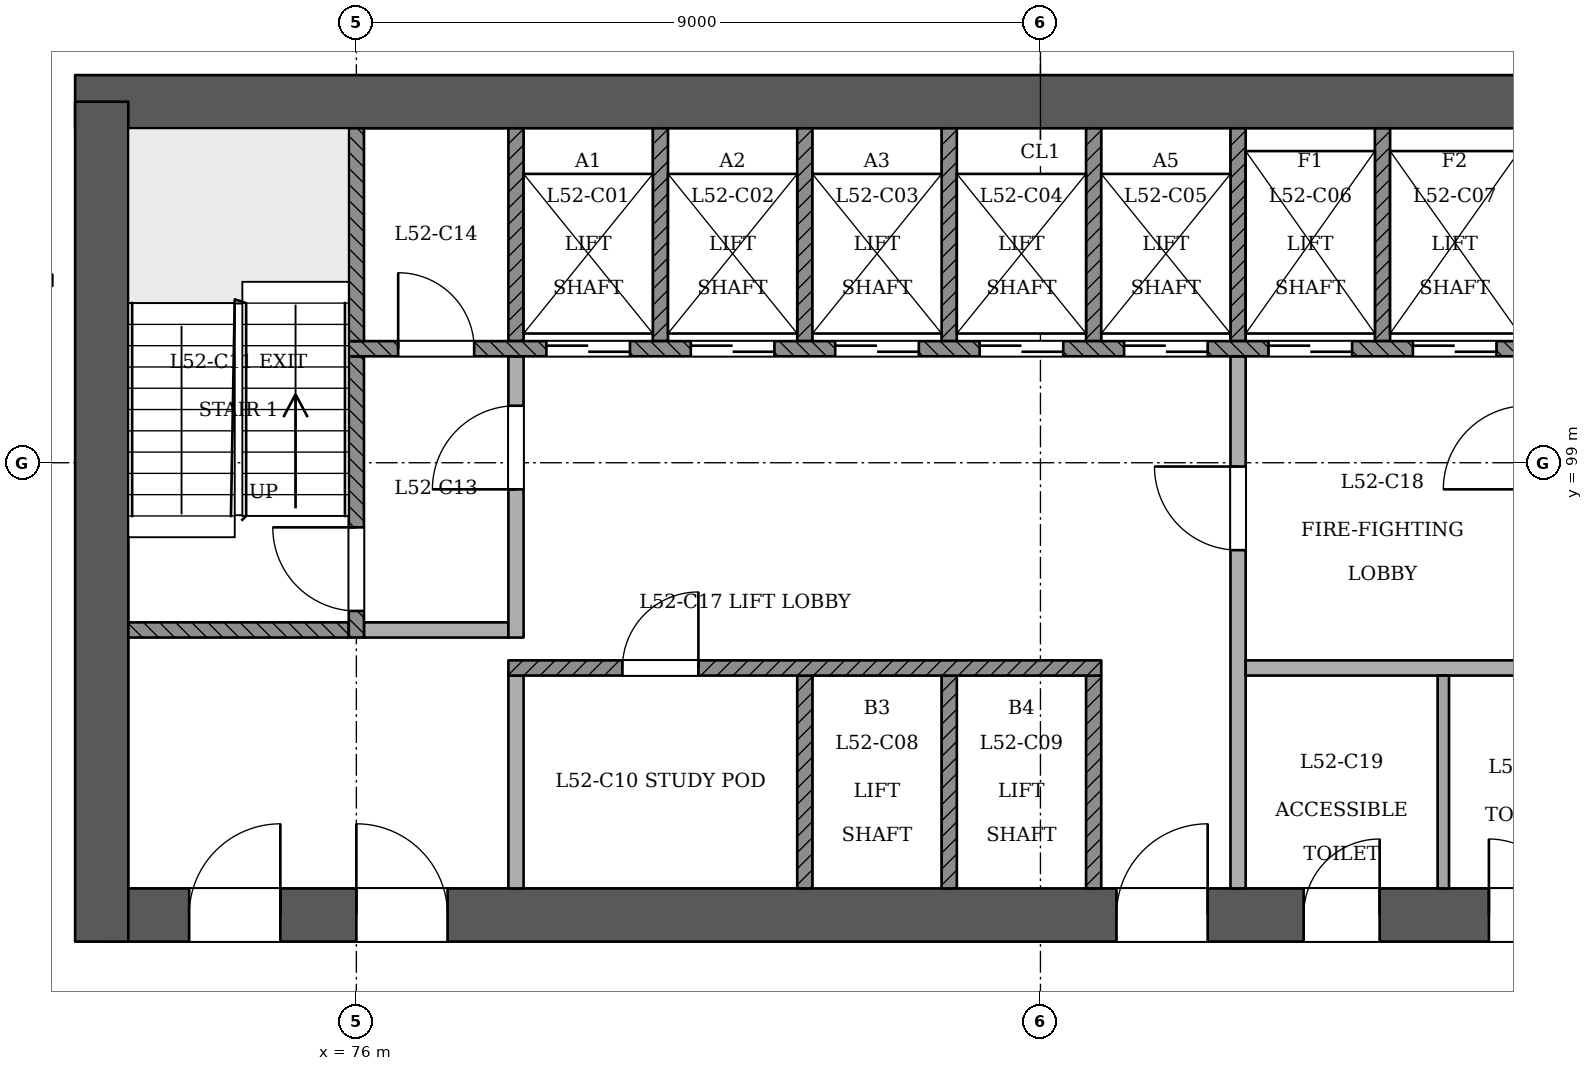
"""IFC4 building model, lengths in metres.
Left out: names, types, materials, properties, quantities, classifications, styles, units other than length and angle.
Written with IfcOpenShell. Run it as: python <this file> out.ifc"""

import sys

from ifc_helpers import new_model, si_unit, direction, frame, frame_2d, origin, place, context, subcontext, project, spatial, rectangle, extrude, element, fill, save


model = new_model("IFC4")
c1 = context("Model", 3, precision=1e-05, world=origin(), true_north=direction((0.0, 1.0)))
c2 = subcontext(c1, "Body", "Model", "MODEL_VIEW")
j1 = project(units=[si_unit("LENGTHUNIT", "METRE"), si_unit("PLANEANGLEUNIT", "RADIAN")], contexts=[c1])
p1 = place(None, origin())
s1 = spatial("IfcSite", under=j1, at=p1, CompositionType="ELEMENT")
p2 = place(p1, origin())
s2 = spatial("IfcBuilding", under=s1, at=p2, CompositionType="ELEMENT")
p3 = place(p2, frame((0.0, 0.0, 201.6)))
s3 = spatial("IfcBuildingStorey", under=s2, at=p3, CompositionType="ELEMENT", Elevation=201.6)
p4 = place(p3, frame((72.65, 93.05, 0.0), z_axis=(0.0, 0.0, 1.0), x_axis=(1.0, 0.0, 0.0)))
e1 = element("IfcWall", 1, at=p4, inside=s3, PredefinedType="SHEAR", context=c2, shape_type="SweptSolid", body=[
    extrude(rectangle(XDim=25.05, YDim=0.7, at=frame_2d((12.525, 0.0))), origin(), (0.0, 0.0, 1.0), 3.6),
])
p5 = place(p4, frame((1.15, 0.0, 0.0)))
e2 = element("IfcOpeningElement", 2, at=p5, cuts=e1, PredefinedType="OPENING", context=c2, shape_type="SweptSolid", body=[
    extrude(rectangle(XDim=1.2, YDim=2.1, at=frame_2d((0.6, 1.05))), frame((0.0, 0.36, 0.0), z_axis=(0.0, -1.0, 0.0), x_axis=(1.0, 0.0, 0.0)), (0.0, 0.0, 1.0), 0.721),
])
p6 = place(p4, frame((3.35, 0.0, 0.0)))
e3 = element("IfcOpeningElement", 3, at=p6, cuts=e1, PredefinedType="OPENING", context=c2, shape_type="SweptSolid", body=[
    extrude(rectangle(XDim=1.2, YDim=2.1, at=frame_2d((0.6, 1.05))), frame((0.0, 0.36, 0.0), z_axis=(0.0, -1.0, 0.0), x_axis=(1.0, 0.0, 0.0)), (0.0, 0.0, 1.0), 0.721),
])
p7 = place(p4, frame((13.35, 0.0, 0.0)))
e4 = element("IfcOpeningElement", 4, at=p7, cuts=e1, PredefinedType="OPENING", context=c2, shape_type="SweptSolid", body=[
    extrude(rectangle(XDim=1.2, YDim=2.1, at=frame_2d((0.6, 1.05))), frame((0.0, 0.36, 0.0), z_axis=(0.0, -1.0, 0.0), x_axis=(1.0, 0.0, 0.0)), (0.0, 0.0, 1.0), 0.721),
])
p8 = place(p4, frame((15.812, 0.0, 0.0)))
e5 = element("IfcOpeningElement", 5, at=p8, cuts=e1, PredefinedType="OPENING", context=c2, shape_type="SweptSolid", body=[
    extrude(rectangle(XDim=1.0, YDim=2.1, at=frame_2d((0.5, 1.05))), frame((0.0, 0.36, 0.0), z_axis=(0.0, -1.0, 0.0), x_axis=(1.0, 0.0, 0.0)), (0.0, 0.0, 1.0), 0.721),
])
p9 = place(p4, frame((18.25, 0.0, 0.0)))
e6 = element("IfcOpeningElement", 6, at=p9, cuts=e1, PredefinedType="OPENING", context=c2, shape_type="SweptSolid", body=[
    extrude(rectangle(XDim=1.0, YDim=2.1, at=frame_2d((0.5, 1.05))), frame((0.0, 0.36, 0.0), z_axis=(0.0, -1.0, 0.0), x_axis=(1.0, 0.0, 0.0)), (0.0, 0.0, 1.0), 0.721),
])
p10 = place(p4, frame((20.6, 0.0, 0.0)))
e7 = element("IfcOpeningElement", 7, at=p10, cuts=e1, PredefinedType="OPENING", context=c2, shape_type="SweptSolid", body=[
    extrude(rectangle(XDim=1.0, YDim=2.1, at=frame_2d((0.5, 1.05))), frame((0.0, 0.36, 0.0), z_axis=(0.0, -1.0, 0.0), x_axis=(1.0, 0.0, 0.0)), (0.0, 0.0, 1.0), 0.721),
])
p11 = place(p4, frame((22.887, 0.0, 0.0)))
e8 = element("IfcOpeningElement", 8, at=p11, cuts=e1, PredefinedType="OPENING", context=c2, shape_type="SweptSolid", body=[
    extrude(rectangle(XDim=1.0, YDim=2.1, at=frame_2d((0.5, 1.05))), frame((0.0, 0.36, 0.0), z_axis=(0.0, -1.0, 0.0), x_axis=(1.0, 0.0, 0.0)), (0.0, 0.0, 1.0), 0.721),
])
p12 = place(p3, frame((97.35, 103.75, 0.0), z_axis=(0.0, 0.0, 1.0), x_axis=(-1.0, 0.0, 0.0)))
e9 = element("IfcWall", 9, at=p12, inside=s3, PredefinedType="SHEAR", context=c2, shape_type="SweptSolid", body=[
    extrude(rectangle(XDim=25.05, YDim=0.7, at=frame_2d((12.525, 0.0))), origin(), (0.0, 0.0, 1.0), 3.6),
])
p13 = place(p3, frame((72.65, 103.75, 0.0), z_axis=(0.0, 0.0, 1.0), x_axis=(0.0, -1.0, 0.0)))
e10 = element("IfcWall", 10, at=p13, inside=s3, PredefinedType="SHEAR", context=c2, shape_type="SweptSolid", body=[
    extrude(rectangle(XDim=11.05, YDim=0.7, at=frame_2d((5.525, 0.0))), origin(), (0.0, 0.0, 1.0), 3.6),
])
p14 = place(p3, frame((78.1, 93.4, 0.0), z_axis=(0.0, 0.0, 1.0), x_axis=(0.0, 1.0, 0.0)))
e11 = element("IfcWall", 11, at=p14, inside=s3, PredefinedType="PARTITIONING", context=c2, shape_type="SweptSolid", body=[
    extrude(rectangle(XDim=2.8, YDim=0.2, at=frame_2d((1.4, 0.0))), origin(), (0.0, 0.0, 1.0), 3.15),
])
for number, where, z_axis, x_axis in (
    (12, (81.9, 93.4, 0.0), (0.0, 0.0, 1.0), (0.0, 1.0, 0.0)),
    (13, (83.8, 93.4, 0.0), (0.0, 0.0, 1.0), (0.0, 1.0, 0.0)),
    (14, (85.7, 93.4, 0.0), (0.0, 0.0, 1.0), (0.0, 1.0, 0.0)),
):
    element("IfcWall", number, at=place(p3, frame(where, z_axis=z_axis, x_axis=x_axis)), inside=s3, PredefinedType="SOLIDWALL", context=c2, shape_type="SweptSolid", body=[
        extrude(rectangle(XDim=2.8, YDim=0.2, at=frame_2d((1.4, 0.0))), origin(), (0.0, 0.0, 1.0), 3.15),
    ])
p15 = place(p3, frame((87.6, 93.4, 0.0), z_axis=(0.0, 0.0, 1.0), x_axis=(0.0, 1.0, 0.0)))
e15 = element("IfcWall", 15, at=p15, inside=s3, PredefinedType="PARTITIONING", context=c2, shape_type="SweptSolid", body=[
    extrude(rectangle(XDim=7.0, YDim=0.2, at=frame_2d((3.5, 0.0))), origin(), (0.0, 0.0, 1.0), 3.15),
])
p16 = place(p15, frame((4.45, 0.0, 0.0)))
e16 = element("IfcOpeningElement", 16, at=p16, cuts=e15, PredefinedType="OPENING", context=c2, shape_type="SweptSolid", body=[
    extrude(rectangle(XDim=1.1, YDim=2.1, at=frame_2d((0.55, 1.05))), frame((0.0, 0.11, 0.0), z_axis=(0.0, -1.0, 0.0), x_axis=(1.0, 0.0, 0.0)), (0.0, 0.0, 1.0), 0.221),
])
p17 = place(p3, frame((90.3, 93.4, 0.0), z_axis=(0.0, 0.0, 1.0), x_axis=(0.0, 1.0, 0.0)))
e17 = element("IfcWall", 17, at=p17, inside=s3, PredefinedType="PARTITIONING", context=c2, shape_type="SweptSolid", body=[
    extrude(rectangle(XDim=2.8, YDim=0.15, at=frame_2d((1.4, 0.0))), origin(), (0.0, 0.0, 1.0), 3.15),
])
p18 = place(p3, frame((78.0, 96.3, 0.0), z_axis=(0.0, 0.0, 1.0), x_axis=(1.0, 0.0, 0.0)))
e18 = element("IfcWall", 18, at=p18, inside=s3, PredefinedType="SOLIDWALL", context=c2, shape_type="SweptSolid", body=[
    extrude(rectangle(XDim=7.8, YDim=0.2, at=frame_2d((3.9, 0.0))), origin(), (0.0, 0.0, 1.0), 3.15),
])
p19 = place(p18, frame((1.5, 0.0, 0.0)))
e19 = element("IfcOpeningElement", 19, at=p19, cuts=e18, PredefinedType="OPENING", context=c2, shape_type="SweptSolid", body=[
    extrude(rectangle(XDim=1.0, YDim=2.1, at=frame_2d((0.5, 1.05))), frame((0.0, 0.11, 0.0), z_axis=(0.0, -1.0, 0.0), x_axis=(1.0, 0.0, 0.0)), (0.0, 0.0, 1.0), 0.221),
])
p20 = place(p3, frame((87.7, 96.3, 0.0), z_axis=(0.0, 0.0, 1.0), x_axis=(1.0, 0.0, 0.0)))
e20 = element("IfcWall", 20, at=p20, inside=s3, PredefinedType="PARTITIONING", context=c2, shape_type="SweptSolid", body=[
    extrude(rectangle(XDim=3.6, YDim=0.2, at=frame_2d((1.8, 0.0))), origin(), (0.0, 0.0, 1.0), 3.15),
])
p21 = place(p3, frame((73.0, 96.8, 0.0), z_axis=(0.0, 0.0, 1.0), x_axis=(1.0, 0.0, 0.0)))
e21 = element("IfcWall", 21, at=p21, inside=s3, PredefinedType="SOLIDWALL", context=c2, shape_type="SweptSolid", body=[
    extrude(rectangle(XDim=2.9, YDim=0.2, at=frame_2d((1.45, 0.0))), origin(), (0.0, 0.0, 1.0), 3.15),
])
p22 = place(p3, frame((76.0, 96.7, 0.0), z_axis=(0.0, 0.0, 1.0), x_axis=(0.0, 1.0, 0.0)))
e22 = element("IfcWall", 22, at=p22, inside=s3, PredefinedType="SOLIDWALL", context=c2, shape_type="SweptSolid", body=[
    extrude(rectangle(XDim=3.7, YDim=0.2, at=frame_2d((1.85, 0.0))), origin(), (0.0, 0.0, 1.0), 3.15),
])
p23 = place(p22, frame((0.35, 0.0, 0.0)))
e23 = element("IfcOpeningElement", 23, at=p23, cuts=e22, PredefinedType="OPENING", context=c2, shape_type="SweptSolid", body=[
    extrude(rectangle(XDim=1.1, YDim=2.1, at=frame_2d((0.55, 1.05))), frame((0.0, 0.11, 0.0), z_axis=(0.0, -1.0, 0.0), x_axis=(1.0, 0.0, 0.0)), (0.0, 0.0, 1.0), 0.221),
])
p24 = place(p3, frame((76.1, 96.8, 0.0), z_axis=(0.0, 0.0, 1.0), x_axis=(1.0, 0.0, 0.0)))
e24 = element("IfcWall", 24, at=p24, inside=s3, PredefinedType="PARTITIONING", context=c2, shape_type="SweptSolid", body=[
    extrude(rectangle(XDim=1.9, YDim=0.2, at=frame_2d((0.95, 0.0))), origin(), (0.0, 0.0, 1.0), 3.15),
])
p25 = place(p3, frame((78.1, 96.7, 0.0), z_axis=(0.0, 0.0, 1.0), x_axis=(0.0, 1.0, 0.0)))
e25 = element("IfcWall", 25, at=p25, inside=s3, PredefinedType="PARTITIONING", context=c2, shape_type="SweptSolid", body=[
    extrude(rectangle(XDim=3.7, YDim=0.2, at=frame_2d((1.85, 0.0))), origin(), (0.0, 0.0, 1.0), 3.15),
])
p26 = place(p25, frame((1.95, 0.0, 0.0)))
e26 = element("IfcOpeningElement", 26, at=p26, cuts=e25, PredefinedType="OPENING", context=c2, shape_type="SweptSolid", body=[
    extrude(rectangle(XDim=1.1, YDim=2.1, at=frame_2d((0.55, 1.05))), frame((0.0, 0.11, 0.0), z_axis=(0.0, -1.0, 0.0), x_axis=(1.0, 0.0, 0.0)), (0.0, 0.0, 1.0), 0.221),
])
p27 = place(p3, frame((75.9, 100.5, 0.0), z_axis=(0.0, 0.0, 1.0), x_axis=(1.0, 0.0, 0.0)))
e27 = element("IfcWall", 27, at=p27, inside=s3, PredefinedType="SOLIDWALL", context=c2, shape_type="SweptSolid", body=[
    extrude(rectangle(XDim=18.2, YDim=0.2, at=frame_2d((9.1, 0.0))), origin(), (0.0, 0.0, 1.0), 3.15),
])
p28 = place(p27, frame((2.6, 0.0, 0.0)))
e28 = element("IfcOpeningElement", 28, at=p28, cuts=e27, PredefinedType="OPENING", context=c2, shape_type="SweptSolid", body=[
    extrude(rectangle(XDim=1.1, YDim=2.1, at=frame_2d((0.55, 1.05))), frame((0.0, 0.11, 0.0), z_axis=(0.0, -1.0, 0.0), x_axis=(1.0, 0.0, 0.0)), (0.0, 0.0, 1.0), 0.221),
])
p29 = place(p27, frame((4.5, 0.0, 0.0)))
e29 = element("IfcOpeningElement", 29, at=p29, cuts=e27, PredefinedType="OPENING", context=c2, shape_type="SweptSolid", body=[
    extrude(rectangle(XDim=1.1, YDim=2.1, at=frame_2d((0.55, 1.05))), frame((0.0, 0.11, 0.0), z_axis=(0.0, -1.0, 0.0), x_axis=(1.0, 0.0, 0.0)), (0.0, 0.0, 1.0), 0.221),
])
p30 = place(p27, frame((6.4, 0.0, 0.0)))
e30 = element("IfcOpeningElement", 30, at=p30, cuts=e27, PredefinedType="OPENING", context=c2, shape_type="SweptSolid", body=[
    extrude(rectangle(XDim=1.1, YDim=2.1, at=frame_2d((0.55, 1.05))), frame((0.0, 0.11, 0.0), z_axis=(0.0, -1.0, 0.0), x_axis=(1.0, 0.0, 0.0)), (0.0, 0.0, 1.0), 0.221),
])
p31 = place(p27, frame((8.3, 0.0, 0.0)))
e31 = element("IfcOpeningElement", 31, at=p31, cuts=e27, PredefinedType="OPENING", context=c2, shape_type="SweptSolid", body=[
    extrude(rectangle(XDim=1.1, YDim=2.1, at=frame_2d((0.55, 1.05))), frame((0.0, 0.11, 0.0), z_axis=(0.0, -1.0, 0.0), x_axis=(1.0, 0.0, 0.0)), (0.0, 0.0, 1.0), 0.221),
])
p32 = place(p27, frame((10.2, 0.0, 0.0)))
e32 = element("IfcOpeningElement", 32, at=p32, cuts=e27, PredefinedType="OPENING", context=c2, shape_type="SweptSolid", body=[
    extrude(rectangle(XDim=1.1, YDim=2.1, at=frame_2d((0.55, 1.05))), frame((0.0, 0.11, 0.0), z_axis=(0.0, -1.0, 0.0), x_axis=(1.0, 0.0, 0.0)), (0.0, 0.0, 1.0), 0.221),
])
p33 = place(p27, frame((12.1, 0.0, 0.0)))
e33 = element("IfcOpeningElement", 33, at=p33, cuts=e27, PredefinedType="OPENING", context=c2, shape_type="SweptSolid", body=[
    extrude(rectangle(XDim=1.1, YDim=2.1, at=frame_2d((0.55, 1.05))), frame((0.0, 0.11, 0.0), z_axis=(0.0, -1.0, 0.0), x_axis=(1.0, 0.0, 0.0)), (0.0, 0.0, 1.0), 0.221),
])
p34 = place(p27, frame((14.0, 0.0, 0.0)))
e34 = element("IfcOpeningElement", 34, at=p34, cuts=e27, PredefinedType="OPENING", context=c2, shape_type="SweptSolid", body=[
    extrude(rectangle(XDim=1.1, YDim=2.1, at=frame_2d((0.55, 1.05))), frame((0.0, 0.11, 0.0), z_axis=(0.0, -1.0, 0.0), x_axis=(1.0, 0.0, 0.0)), (0.0, 0.0, 1.0), 0.221),
])
p35 = place(p27, frame((0.65, 0.0, 0.0)))
e35 = element("IfcOpeningElement", 35, at=p35, cuts=e27, PredefinedType="OPENING", context=c2, shape_type="SweptSolid", body=[
    extrude(rectangle(XDim=1.0, YDim=2.1, at=frame_2d((0.5, 1.05))), frame((0.0, 0.11, 0.0), z_axis=(0.0, -1.0, 0.0), x_axis=(1.0, 0.0, 0.0)), (0.0, 0.0, 1.0), 0.221),
])
p36 = place(p27, frame((16.3, 0.0, 0.0)))
e36 = element("IfcOpeningElement", 36, at=p36, cuts=e27, PredefinedType="OPENING", context=c2, shape_type="SweptSolid", body=[
    extrude(rectangle(XDim=1.0, YDim=2.1, at=frame_2d((0.5, 1.05))), frame((0.0, 0.11, 0.0), z_axis=(0.0, -1.0, 0.0), x_axis=(1.0, 0.0, 0.0)), (0.0, 0.0, 1.0), 0.221),
])
for number, where, z_axis, x_axis in (
    (37, (76.0, 100.6, 0.0), (0.0, 0.0, 1.0), (0.0, 1.0, 0.0)),
    (38, (78.1, 100.6, 0.0), (0.0, 0.0, 1.0), (0.0, 1.0, 0.0)),
    (39, (80.0, 100.6, 0.0), (0.0, 0.0, 1.0), (0.0, 1.0, 0.0)),
    (40, (81.9, 100.6, 0.0), (0.0, 0.0, 1.0), (0.0, 1.0, 0.0)),
    (41, (83.8, 100.6, 0.0), (0.0, 0.0, 1.0), (0.0, 1.0, 0.0)),
    (42, (85.7, 100.6, 0.0), (0.0, 0.0, 1.0), (0.0, 1.0, 0.0)),
    (43, (87.6, 100.6, 0.0), (0.0, 0.0, 1.0), (0.0, 1.0, 0.0)),
    (44, (89.5, 100.6, 0.0), (0.0, 0.0, 1.0), (0.0, 1.0, 0.0)),
):
    element("IfcWall", number, at=place(p3, frame(where, z_axis=z_axis, x_axis=x_axis)), inside=s3, PredefinedType="SOLIDWALL", context=c2, shape_type="SweptSolid", body=[
        extrude(rectangle(XDim=2.8, YDim=0.2, at=frame_2d((1.4, 0.0))), origin(), (0.0, 0.0, 1.0), 3.15),
    ])
p37 = place(p28, origin())
e45 = element("IfcDoor", 45, at=p37, inside=s3, OperationType="SLIDING_TO_RIGHT", PredefinedType="NOTDEFINED", context=c2, shape_type="SweptSolid", body=[
    extrude(rectangle(XDim=1.1, YDim=2.1, at=frame_2d((0.55, 1.05))), frame((0.0, 0.025, 0.0), z_axis=(0.0, -1.0, 0.0), x_axis=(1.0, 0.0, 0.0)), (0.0, 0.0, 1.0), 0.05),
])
fill(e28, e45)
p38 = place(p29, origin())
e46 = element("IfcDoor", 46, at=p38, inside=s3, OperationType="SLIDING_TO_LEFT", PredefinedType="NOTDEFINED", context=c2, shape_type="SweptSolid", body=[
    extrude(rectangle(XDim=1.1, YDim=2.1, at=frame_2d((0.55, 1.05))), frame((0.0, 0.025, 0.0), z_axis=(0.0, -1.0, 0.0), x_axis=(1.0, 0.0, 0.0)), (0.0, 0.0, 1.0), 0.05),
])
fill(e29, e46)
p39 = place(p30, origin())
e47 = element("IfcDoor", 47, at=p39, inside=s3, OperationType="SLIDING_TO_RIGHT", PredefinedType="NOTDEFINED", context=c2, shape_type="SweptSolid", body=[
    extrude(rectangle(XDim=1.1, YDim=2.1, at=frame_2d((0.55, 1.05))), frame((0.0, 0.025, 0.0), z_axis=(0.0, -1.0, 0.0), x_axis=(1.0, 0.0, 0.0)), (0.0, 0.0, 1.0), 0.05),
])
fill(e30, e47)
p40 = place(p31, origin())
e48 = element("IfcDoor", 48, at=p40, inside=s3, OperationType="SLIDING_TO_LEFT", PredefinedType="NOTDEFINED", context=c2, shape_type="SweptSolid", body=[
    extrude(rectangle(XDim=1.1, YDim=2.1, at=frame_2d((0.55, 1.05))), frame((0.0, 0.025, 0.0), z_axis=(0.0, -1.0, 0.0), x_axis=(1.0, 0.0, 0.0)), (0.0, 0.0, 1.0), 0.05),
])
fill(e31, e48)
p41 = place(p32, origin())
e49 = element("IfcDoor", 49, at=p41, inside=s3, OperationType="SLIDING_TO_RIGHT", PredefinedType="NOTDEFINED", context=c2, shape_type="SweptSolid", body=[
    extrude(rectangle(XDim=1.1, YDim=2.1, at=frame_2d((0.55, 1.05))), frame((0.0, 0.025, 0.0), z_axis=(0.0, -1.0, 0.0), x_axis=(1.0, 0.0, 0.0)), (0.0, 0.0, 1.0), 0.05),
])
fill(e32, e49)
p42 = place(p33, origin())
e50 = element("IfcDoor", 50, at=p42, inside=s3, OperationType="SLIDING_TO_RIGHT", PredefinedType="NOTDEFINED", context=c2, shape_type="SweptSolid", body=[
    extrude(rectangle(XDim=1.1, YDim=2.1, at=frame_2d((0.55, 1.05))), frame((0.0, 0.025, 0.0), z_axis=(0.0, -1.0, 0.0), x_axis=(1.0, 0.0, 0.0)), (0.0, 0.0, 1.0), 0.05),
])
fill(e33, e50)
p43 = place(p34, origin())
e51 = element("IfcDoor", 51, at=p43, inside=s3, OperationType="SLIDING_TO_LEFT", PredefinedType="NOTDEFINED", context=c2, shape_type="SweptSolid", body=[
    extrude(rectangle(XDim=1.1, YDim=2.1, at=frame_2d((0.55, 1.05))), frame((0.0, 0.025, 0.0), z_axis=(0.0, -1.0, 0.0), x_axis=(1.0, 0.0, 0.0)), (0.0, 0.0, 1.0), 0.05),
])
fill(e34, e51)
p44 = place(p23, origin())
e52 = element("IfcDoor", 52, at=p44, inside=s3, OperationType="SINGLE_SWING_RIGHT", PredefinedType="NOTDEFINED", context=c2, shape_type="SweptSolid", body=[
    extrude(rectangle(XDim=1.1, YDim=2.1, at=frame_2d((0.55, 1.05))), frame((0.0, 0.025, 0.0), z_axis=(0.0, -1.0, 0.0), x_axis=(1.0, 0.0, 0.0)), (0.0, 0.0, 1.0), 0.05),
])
fill(e23, e52)
p45 = place(p26, origin())
e53 = element("IfcDoor", 53, at=p45, inside=s3, OperationType="SINGLE_SWING_LEFT", PredefinedType="NOTDEFINED", context=c2, shape_type="SweptSolid", body=[
    extrude(rectangle(XDim=1.1, YDim=2.1, at=frame_2d((0.55, 1.05))), frame((0.0, 0.025, 0.0), z_axis=(0.0, -1.0, 0.0), x_axis=(1.0, 0.0, 0.0)), (0.0, 0.0, 1.0), 0.05),
])
fill(e26, e53)
p46 = place(p16, origin())
e54 = element("IfcDoor", 54, at=p46, inside=s3, OperationType="SINGLE_SWING_RIGHT", PredefinedType="NOTDEFINED", context=c2, shape_type="SweptSolid", body=[
    extrude(rectangle(XDim=1.1, YDim=2.1, at=frame_2d((0.55, 1.05))), frame((0.0, 0.025, 0.0), z_axis=(0.0, -1.0, 0.0), x_axis=(1.0, 0.0, 0.0)), (0.0, 0.0, 1.0), 0.05),
])
fill(e16, e54)
p47 = place(p5, origin())
e55 = element("IfcDoor", 55, at=p47, inside=s3, OperationType="SINGLE_SWING_RIGHT", PredefinedType="NOTDEFINED", context=c2, shape_type="SweptSolid", body=[
    extrude(rectangle(XDim=1.2, YDim=2.1, at=frame_2d((0.6, 1.05))), frame((0.0, 0.025, 0.0), z_axis=(0.0, -1.0, 0.0), x_axis=(1.0, 0.0, 0.0)), (0.0, 0.0, 1.0), 0.05),
])
fill(e2, e55)
p48 = place(p6, origin())
e56 = element("IfcDoor", 56, at=p48, inside=s3, OperationType="SINGLE_SWING_LEFT", PredefinedType="NOTDEFINED", context=c2, shape_type="SweptSolid", body=[
    extrude(rectangle(XDim=1.2, YDim=2.1, at=frame_2d((0.6, 1.05))), frame((0.0, 0.025, 0.0), z_axis=(0.0, -1.0, 0.0), x_axis=(1.0, 0.0, 0.0)), (0.0, 0.0, 1.0), 0.05),
])
fill(e3, e56)
p49 = place(p7, origin())
e57 = element("IfcDoor", 57, at=p49, inside=s3, OperationType="SINGLE_SWING_RIGHT", PredefinedType="NOTDEFINED", context=c2, shape_type="SweptSolid", body=[
    extrude(rectangle(XDim=1.2, YDim=2.1, at=frame_2d((0.6, 1.05))), frame((0.0, 0.025, 0.0), z_axis=(0.0, -1.0, 0.0), x_axis=(1.0, 0.0, 0.0)), (0.0, 0.0, 1.0), 0.05),
])
fill(e4, e57)
p50 = place(p35, origin())
e58 = element("IfcDoor", 58, at=p50, inside=s3, OperationType="SINGLE_SWING_LEFT", PredefinedType="NOTDEFINED", context=c2, shape_type="SweptSolid", body=[
    extrude(rectangle(XDim=1.0, YDim=2.1, at=frame_2d((0.5, 1.05))), frame((0.0, 0.025, 0.0), z_axis=(0.0, -1.0, 0.0), x_axis=(1.0, 0.0, 0.0)), (0.0, 0.0, 1.0), 0.05),
])
fill(e35, e58)
p51 = place(p8, origin())
e59 = element("IfcDoor", 59, at=p51, inside=s3, OperationType="SINGLE_SWING_RIGHT", PredefinedType="NOTDEFINED", context=c2, shape_type="SweptSolid", body=[
    extrude(rectangle(XDim=1.0, YDim=2.1, at=frame_2d((0.5, 1.05))), frame((0.0, 0.025, 0.0), z_axis=(0.0, -1.0, 0.0), x_axis=(1.0, 0.0, 0.0)), (0.0, 0.0, 1.0), 0.05),
])
fill(e5, e59)
p52 = place(p9, origin())
e60 = element("IfcDoor", 60, at=p52, inside=s3, OperationType="SINGLE_SWING_LEFT", PredefinedType="NOTDEFINED", context=c2, shape_type="SweptSolid", body=[
    extrude(rectangle(XDim=1.0, YDim=2.1, at=frame_2d((0.5, 1.05))), frame((0.0, 0.025, 0.0), z_axis=(0.0, -1.0, 0.0), x_axis=(1.0, 0.0, 0.0)), (0.0, 0.0, 1.0), 0.05),
])
fill(e6, e60)
p53 = place(p19, origin())
e61 = element("IfcDoor", 61, at=p53, inside=s3, OperationType="SINGLE_SWING_RIGHT", PredefinedType="NOTDEFINED", context=c2, shape_type="SweptSolid", body=[
    extrude(rectangle(XDim=1.0, YDim=2.1, at=frame_2d((0.5, 1.05))), frame((0.0, 0.025, 0.0), z_axis=(0.0, -1.0, 0.0), x_axis=(1.0, 0.0, 0.0)), (0.0, 0.0, 1.0), 0.05),
])
fill(e19, e61)
save(model, sys.argv[1])
